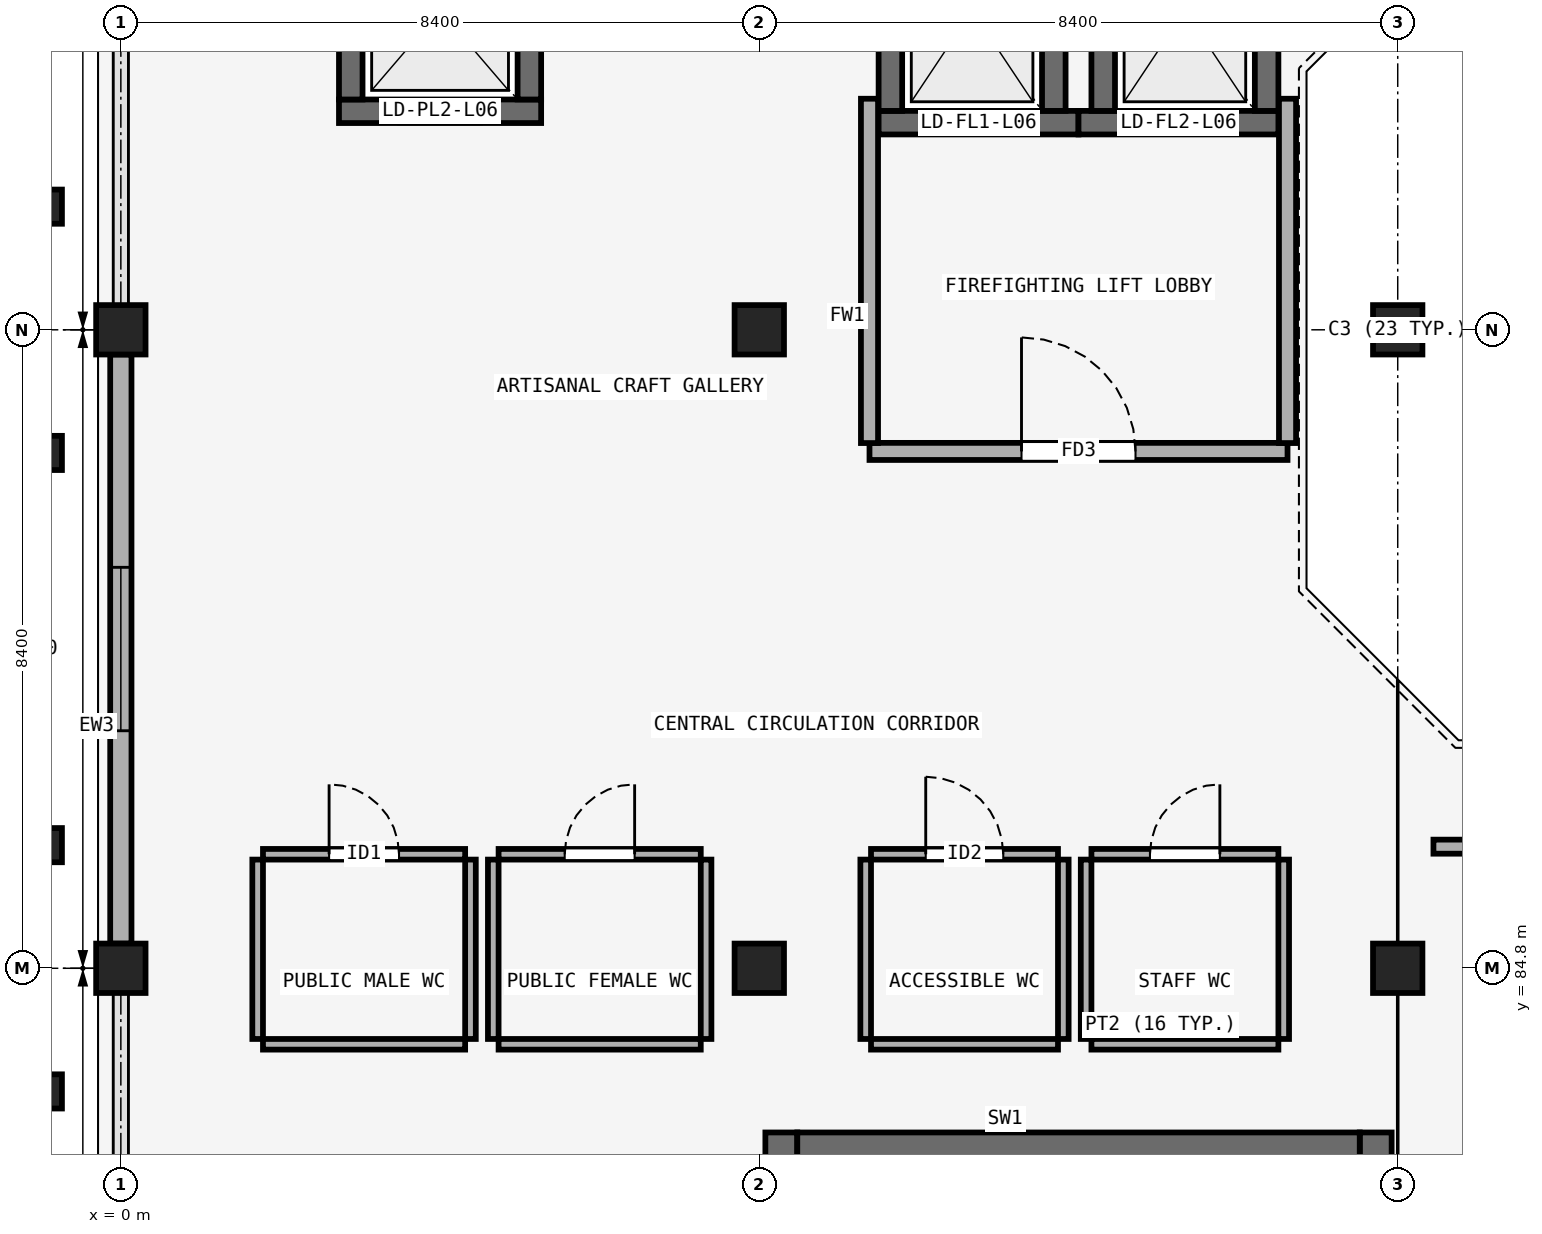
"""IFC4 building model, lengths in metres.
Left out: names, types, materials, properties, quantities, classifications, styles, units other than length and angle.
Written with IfcOpenShell. Run it as: python <this file> out.ifc"""

import sys

from ifc_helpers import new_model, si_unit, direction, frame, frame_2d, origin, origin_2d, place, context, subcontext, project, spatial, rectangle, extrude, element, fill, save


model = new_model("IFC4")
c1 = context("Model", 3, precision=1e-05, world=origin(), true_north=direction((0.0, 1.0)))
c2 = subcontext(c1, "Body", "Model", "MODEL_VIEW")
j1 = project(units=[si_unit("LENGTHUNIT", "METRE"), si_unit("PLANEANGLEUNIT", "RADIAN")], contexts=[c1])
p1 = place(None, origin())
s1 = spatial("IfcSite", under=j1, at=p1, CompositionType="ELEMENT")
p2 = place(p1, origin())
s2 = spatial("IfcBuilding", under=s1, at=p2, CompositionType="ELEMENT")
p3 = place(p2, frame((0.0, 0.0, 27.9)))
s3 = spatial("IfcBuildingStorey", under=s2, at=p3, CompositionType="ELEMENT", Elevation=27.9)
for number, where, z_axis, x_axis in (
    (1, (0.0, 84.8, 0.0), (0.0, 0.0, 1.0), (1.0, 0.0, 0.0)),
    (2, (8.4, 84.8, 0.0), (0.0, 0.0, 1.0), (1.0, 0.0, 0.0)),
    (3, (16.8, 84.8, 0.0), (0.0, 0.0, 1.0), (1.0, 0.0, 0.0)),
    (4, (0.0, 93.2, 0.0), (0.0, 0.0, 1.0), (1.0, 0.0, 0.0)),
    (5, (8.4, 93.2, 0.0), (0.0, 0.0, 1.0), (1.0, 0.0, 0.0)),
    (6, (16.8, 93.2, 0.0), (0.0, 0.0, 1.0), (1.0, 0.0, 0.0)),
):
    element("IfcColumn", number, at=place(p3, frame(where, z_axis=z_axis, x_axis=x_axis)), inside=s3, PredefinedType="COLUMN", context=c2, shape_type="SweptSolid", body=[
        extrude(rectangle(XDim=0.65, YDim=0.65, at=origin_2d()), origin(), (0.0, 0.0, 1.0), 4.5),
    ])
for number, where, z_axis, x_axis in (
    (7, (-1.05, 83.18, 0.0), (0.0, 0.0, 1.0), (0.0, 1.0, 0.0)),
    (8, (-1.05, 86.42, 0.0), (0.0, 0.0, 1.0), (0.0, 1.0, 0.0)),
    (9, (-1.05, 91.58, 0.0), (0.0, 0.0, 1.0), (0.0, 1.0, 0.0)),
    (10, (-1.05, 94.82, 0.0), (0.0, 0.0, 1.0), (0.0, 1.0, 0.0)),
):
    element("IfcColumn", number, at=place(p3, frame(where, z_axis=z_axis, x_axis=x_axis)), inside=s3, PredefinedType="PILASTER", context=c2, shape_type="SweptSolid", body=[
        extrude(rectangle(XDim=0.45, YDim=0.55, at=origin_2d()), origin(), (0.0, 0.0, 1.0), 4.5),
    ])
p4 = place(p3, frame((0.0, 85.125, 0.0), z_axis=(0.0, 0.0, 1.0), x_axis=(0.0, 1.0, 0.0)))
e11 = element("IfcWall", 11, at=p4, inside=s3, PredefinedType="SOLIDWALL", context=c2, shape_type="SweptSolid", body=[
    extrude(rectangle(XDim=7.75, YDim=0.28, at=frame_2d((3.875, 0.0))), origin(), (0.0, 0.0, 1.0), 3.45),
])
p5 = place(p4, frame((2.8, 0.0, 0.95)))
e12 = element("IfcOpeningElement", 12, at=p5, cuts=e11, PredefinedType="OPENING", context=c2, shape_type="SweptSolid", body=[
    extrude(rectangle(XDim=2.15, YDim=1.35, at=frame_2d((1.075, 0.675))), frame((0.0, 0.15, 0.0), z_axis=(0.0, -1.0, 0.0), x_axis=(1.0, 0.0, 0.0)), (0.0, 0.0, 1.0), 0.3),
])
p6 = place(p3, frame((8.69, 82.64, 0.0), z_axis=(0.0, 0.0, 1.0), x_axis=(0.0, -1.0, 0.0)))
e13 = element("IfcWall", 13, at=p6, inside=s3, PredefinedType="SHEAR", context=c2, shape_type="SweptSolid", body=[
    extrude(rectangle(XDim=4.08, YDim=0.42, at=frame_2d((2.04, 0.0))), origin(), (0.0, 0.0, 1.0), 4.2),
])
p7 = place(p6, frame((1.315, 0.0, 0.0)))
e14 = element("IfcOpeningElement", 14, at=p7, cuts=e13, PredefinedType="OPENING", context=c2, shape_type="SweptSolid", body=[
    extrude(rectangle(XDim=1.45, YDim=2.2, at=frame_2d((0.725, 1.1))), frame((0.0, 0.22, 0.0), z_axis=(0.0, -1.0, 0.0), x_axis=(1.0, 0.0, 0.0)), (0.0, 0.0, 1.0), 0.44),
])
p8 = place(p3, frame((16.51, 78.56, 0.0), z_axis=(0.0, 0.0, 1.0), x_axis=(0.0, 1.0, 0.0)))
e15 = element("IfcWall", 15, at=p8, inside=s3, PredefinedType="SHEAR", context=c2, shape_type="SweptSolid", body=[
    extrude(rectangle(XDim=4.08, YDim=0.42, at=frame_2d((2.04, 0.0))), origin(), (0.0, 0.0, 1.0), 4.2),
])
p9 = place(p3, frame((8.9, 82.43, 0.0), z_axis=(0.0, 0.0, 1.0), x_axis=(1.0, 0.0, 0.0)))
e16 = element("IfcWall", 16, at=p9, inside=s3, PredefinedType="SHEAR", context=c2, shape_type="SweptSolid", body=[
    extrude(rectangle(XDim=7.4, YDim=0.42, at=frame_2d((3.7, 0.0))), origin(), (0.0, 0.0, 1.0), 4.2),
])
p10 = place(p3, frame((9.97, 95.925, 0.0), z_axis=(0.0, 0.0, 1.0), x_axis=(1.0, 0.0, 0.0)))
e17 = element("IfcWall", 17, at=p10, inside=s3, PredefinedType="SHEAR", context=c2, shape_type="SweptSolid", body=[
    extrude(rectangle(XDim=2.63, YDim=0.31, at=frame_2d((1.315, 0.0))), origin(), (0.0, 0.0, 1.0), 4.2),
])
p11 = place(p10, frame((0.715, 0.0, 0.0)))
e18 = element("IfcOpeningElement", 18, at=p11, cuts=e17, PredefinedType="OPENING", context=c2, shape_type="SweptSolid", body=[
    extrude(rectangle(XDim=1.2, YDim=2.25, at=frame_2d((0.6, 1.125))), frame((0.0, 0.165, 0.0), z_axis=(0.0, -1.0, 0.0), x_axis=(1.0, 0.0, 0.0)), (0.0, 0.0, 1.0), 0.33),
])
for number, where, z_axis, x_axis in (
    (19, (10.125, 96.08, 0.0), (0.0, 0.0, 1.0), (0.0, 1.0, 0.0)),
    (20, (12.275, 96.08, 0.0), (0.0, 0.0, 1.0), (0.0, 1.0, 0.0)),
):
    element("IfcWall", number, at=place(p3, frame(where, z_axis=z_axis, x_axis=x_axis)), inside=s3, PredefinedType="SHEAR", context=c2, shape_type="SweptSolid", body=[
        extrude(rectangle(XDim=2.64, YDim=0.31, at=frame_2d((1.32, 0.0))), origin(), (0.0, 0.0, 1.0), 4.2),
    ])
p12 = place(p3, frame((12.6, 95.925, 0.0), z_axis=(0.0, 0.0, 1.0), x_axis=(1.0, 0.0, 0.0)))
e21 = element("IfcWall", 21, at=p12, inside=s3, PredefinedType="SHEAR", context=c2, shape_type="SweptSolid", body=[
    extrude(rectangle(XDim=2.63, YDim=0.31, at=frame_2d((1.315, 0.0))), origin(), (0.0, 0.0, 1.0), 4.2),
])
p13 = place(p12, frame((0.715, 0.0, 0.0)))
e22 = element("IfcOpeningElement", 22, at=p13, cuts=e21, PredefinedType="OPENING", context=c2, shape_type="SweptSolid", body=[
    extrude(rectangle(XDim=1.2, YDim=2.25, at=frame_2d((0.6, 1.125))), frame((0.0, 0.165, 0.0), z_axis=(0.0, -1.0, 0.0), x_axis=(1.0, 0.0, 0.0)), (0.0, 0.0, 1.0), 0.33),
])
for number, where, z_axis, x_axis in (
    (23, (12.925, 96.08, 0.0), (0.0, 0.0, 1.0), (0.0, 1.0, 0.0)),
    (24, (15.075, 96.08, 0.0), (0.0, 0.0, 1.0), (0.0, 1.0, 0.0)),
):
    element("IfcWall", number, at=place(p3, frame(where, z_axis=z_axis, x_axis=x_axis)), inside=s3, PredefinedType="SHEAR", context=c2, shape_type="SweptSolid", body=[
        extrude(rectangle(XDim=2.64, YDim=0.31, at=frame_2d((1.32, 0.0))), origin(), (0.0, 0.0, 1.0), 4.2),
    ])
p14 = place(p3, frame((2.87, 96.075, 0.0), z_axis=(0.0, 0.0, 1.0), x_axis=(1.0, 0.0, 0.0)))
e25 = element("IfcWall", 25, at=p14, inside=s3, PredefinedType="SHEAR", context=c2, shape_type="SweptSolid", body=[
    extrude(rectangle(XDim=2.66, YDim=0.31, at=frame_2d((1.33, 0.0))), origin(), (0.0, 0.0, 1.0), 4.2),
])
p15 = place(p14, frame((0.78, 0.0, 0.0)))
e26 = element("IfcOpeningElement", 26, at=p15, cuts=e25, PredefinedType="OPENING", context=c2, shape_type="SweptSolid", body=[
    extrude(rectangle(XDim=1.1, YDim=2.2, at=frame_2d((0.55, 1.1))), frame((0.0, 0.165, 0.0), z_axis=(0.0, -1.0, 0.0), x_axis=(1.0, 0.0, 0.0)), (0.0, 0.0, 1.0), 0.33),
])
for number, where, z_axis, x_axis in (
    (27, (3.025, 96.23, 0.0), (0.0, 0.0, 1.0), (0.0, 1.0, 0.0)),
    (28, (5.375, 96.23, 0.0), (0.0, 0.0, 1.0), (0.0, 1.0, 0.0)),
):
    element("IfcWall", number, at=place(p3, frame(where, z_axis=z_axis, x_axis=x_axis)), inside=s3, PredefinedType="SHEAR", context=c2, shape_type="SweptSolid", body=[
        extrude(rectangle(XDim=2.34, YDim=0.31, at=frame_2d((1.17, 0.0))), origin(), (0.0, 0.0, 1.0), 4.2),
    ])
p16 = place(p3, frame((9.85, 91.6, 0.0), z_axis=(0.0, 0.0, 1.0), x_axis=(1.0, 0.0, 0.0)))
e29 = element("IfcWall", 29, at=p16, inside=s3, PredefinedType="PARTITIONING", context=c2, shape_type="SweptSolid", body=[
    extrude(rectangle(XDim=5.5, YDim=0.225, at=frame_2d((2.75, 0.0))), origin(), (0.0, 0.0, 1.0), 4.2),
])
p17 = place(p16, frame((2.0, 0.0, 0.0)))
e30 = element("IfcOpeningElement", 30, at=p17, cuts=e29, PredefinedType="OPENING", context=c2, shape_type="SweptSolid", body=[
    extrude(rectangle(XDim=1.5, YDim=2.25, at=frame_2d((0.75, 1.125))), frame((0.0, 0.123, 0.0), z_axis=(0.0, -1.0, 0.0), x_axis=(1.0, 0.0, 0.0)), (0.0, 0.0, 1.0), 0.245),
])
for number, where, z_axis, x_axis in (
    (31, (9.85, 91.71, 0.0), (0.0, 0.0, 1.0), (0.0, 1.0, 0.0)),
    (32, (15.35, 91.71, 0.0), (0.0, 0.0, 1.0), (0.0, 1.0, 0.0)),
):
    element("IfcWall", number, at=place(p3, frame(where, z_axis=z_axis, x_axis=x_axis)), inside=s3, PredefinedType="PARTITIONING", context=c2, shape_type="SweptSolid", body=[
        extrude(rectangle(XDim=4.53, YDim=0.225, at=frame_2d((2.265, 0.0))), origin(), (0.0, 0.0, 1.0), 3.5),
    ])
p18 = place(p3, frame((1.87, 86.3, 0.0), z_axis=(0.0, 0.0, 1.0), x_axis=(1.0, 0.0, 0.0)))
e33 = element("IfcWall", 33, at=p18, inside=s3, PredefinedType="PARTITIONING", context=c2, shape_type="SweptSolid", body=[
    extrude(rectangle(XDim=2.66, YDim=0.14, at=frame_2d((1.33, 0.0))), origin(), (0.0, 0.0, 1.0), 4.2),
])
p19 = place(p18, frame((0.87, 0.0, 0.0)))
e34 = element("IfcOpeningElement", 34, at=p19, cuts=e33, PredefinedType="OPENING", context=c2, shape_type="SweptSolid", body=[
    extrude(rectangle(XDim=0.92, YDim=2.12, at=frame_2d((0.46, 1.06))), frame((0.0, 0.08, 0.0), z_axis=(0.0, -1.0, 0.0), x_axis=(1.0, 0.0, 0.0)), (0.0, 0.0, 1.0), 0.16),
])
p20 = place(p3, frame((1.87, 83.8, 0.0), z_axis=(0.0, 0.0, 1.0), x_axis=(1.0, 0.0, 0.0)))
e35 = element("IfcWall", 35, at=p20, inside=s3, PredefinedType="PARTITIONING", context=c2, shape_type="SweptSolid", body=[
    extrude(rectangle(XDim=2.66, YDim=0.14, at=frame_2d((1.33, 0.0))), origin(), (0.0, 0.0, 1.0), 4.2),
])
for number, where, z_axis, x_axis in (
    (36, (1.8, 83.87, 0.0), (0.0, 0.0, 1.0), (0.0, 1.0, 0.0)),
    (37, (4.6, 83.87, 0.0), (0.0, 0.0, 1.0), (0.0, 1.0, 0.0)),
):
    element("IfcWall", number, at=place(p3, frame(where, z_axis=z_axis, x_axis=x_axis)), inside=s3, PredefinedType="PARTITIONING", context=c2, shape_type="SweptSolid", body=[
        extrude(rectangle(XDim=2.36, YDim=0.14, at=frame_2d((1.18, 0.0))), origin(), (0.0, 0.0, 1.0), 3.45),
    ])
p21 = place(p3, frame((4.97, 86.3, 0.0), z_axis=(0.0, 0.0, 1.0), x_axis=(1.0, 0.0, 0.0)))
e38 = element("IfcWall", 38, at=p21, inside=s3, PredefinedType="PARTITIONING", context=c2, shape_type="SweptSolid", body=[
    extrude(rectangle(XDim=2.66, YDim=0.14, at=frame_2d((1.33, 0.0))), origin(), (0.0, 0.0, 1.0), 4.2),
])
p22 = place(p21, frame((0.87, 0.0, 0.0)))
e39 = element("IfcOpeningElement", 39, at=p22, cuts=e38, PredefinedType="OPENING", context=c2, shape_type="SweptSolid", body=[
    extrude(rectangle(XDim=0.92, YDim=2.12, at=frame_2d((0.46, 1.06))), frame((0.0, 0.08, 0.0), z_axis=(0.0, -1.0, 0.0), x_axis=(1.0, 0.0, 0.0)), (0.0, 0.0, 1.0), 0.16),
])
p23 = place(p3, frame((4.97, 83.8, 0.0), z_axis=(0.0, 0.0, 1.0), x_axis=(1.0, 0.0, 0.0)))
e40 = element("IfcWall", 40, at=p23, inside=s3, PredefinedType="PARTITIONING", context=c2, shape_type="SweptSolid", body=[
    extrude(rectangle(XDim=2.66, YDim=0.14, at=frame_2d((1.33, 0.0))), origin(), (0.0, 0.0, 1.0), 4.2),
])
for number, where, z_axis, x_axis in (
    (41, (4.9, 83.87, 0.0), (0.0, 0.0, 1.0), (0.0, 1.0, 0.0)),
    (42, (7.7, 83.87, 0.0), (0.0, 0.0, 1.0), (0.0, 1.0, 0.0)),
):
    element("IfcWall", number, at=place(p3, frame(where, z_axis=z_axis, x_axis=x_axis)), inside=s3, PredefinedType="PARTITIONING", context=c2, shape_type="SweptSolid", body=[
        extrude(rectangle(XDim=2.36, YDim=0.14, at=frame_2d((1.18, 0.0))), origin(), (0.0, 0.0, 1.0), 3.45),
    ])
p24 = place(p3, frame((9.87, 86.3, 0.0), z_axis=(0.0, 0.0, 1.0), x_axis=(1.0, 0.0, 0.0)))
e43 = element("IfcWall", 43, at=p24, inside=s3, PredefinedType="PARTITIONING", context=c2, shape_type="SweptSolid", body=[
    extrude(rectangle(XDim=2.46, YDim=0.14, at=frame_2d((1.23, 0.0))), origin(), (0.0, 0.0, 1.0), 4.2),
])
p25 = place(p24, frame((0.72, 0.0, 0.0)))
e44 = element("IfcOpeningElement", 44, at=p25, cuts=e43, PredefinedType="OPENING", context=c2, shape_type="SweptSolid", body=[
    extrude(rectangle(XDim=1.02, YDim=2.15, at=frame_2d((0.51, 1.075))), frame((0.0, 0.08, 0.0), z_axis=(0.0, -1.0, 0.0), x_axis=(1.0, 0.0, 0.0)), (0.0, 0.0, 1.0), 0.16),
])
p26 = place(p3, frame((9.87, 83.8, 0.0), z_axis=(0.0, 0.0, 1.0), x_axis=(1.0, 0.0, 0.0)))
e45 = element("IfcWall", 45, at=p26, inside=s3, PredefinedType="PARTITIONING", context=c2, shape_type="SweptSolid", body=[
    extrude(rectangle(XDim=2.46, YDim=0.14, at=frame_2d((1.23, 0.0))), origin(), (0.0, 0.0, 1.0), 4.2),
])
for number, where, z_axis, x_axis in (
    (46, (9.8, 83.87, 0.0), (0.0, 0.0, 1.0), (0.0, 1.0, 0.0)),
    (47, (12.4, 83.87, 0.0), (0.0, 0.0, 1.0), (0.0, 1.0, 0.0)),
):
    element("IfcWall", number, at=place(p3, frame(where, z_axis=z_axis, x_axis=x_axis)), inside=s3, PredefinedType="PARTITIONING", context=c2, shape_type="SweptSolid", body=[
        extrude(rectangle(XDim=2.36, YDim=0.14, at=frame_2d((1.18, 0.0))), origin(), (0.0, 0.0, 1.0), 3.45),
    ])
p27 = place(p3, frame((12.77, 86.3, 0.0), z_axis=(0.0, 0.0, 1.0), x_axis=(1.0, 0.0, 0.0)))
e48 = element("IfcWall", 48, at=p27, inside=s3, PredefinedType="PARTITIONING", context=c2, shape_type="SweptSolid", body=[
    extrude(rectangle(XDim=2.46, YDim=0.14, at=frame_2d((1.23, 0.0))), origin(), (0.0, 0.0, 1.0), 4.2),
])
p28 = place(p27, frame((0.77, 0.0, 0.0)))
e49 = element("IfcOpeningElement", 49, at=p28, cuts=e48, PredefinedType="OPENING", context=c2, shape_type="SweptSolid", body=[
    extrude(rectangle(XDim=0.92, YDim=2.12, at=frame_2d((0.46, 1.06))), frame((0.0, 0.08, 0.0), z_axis=(0.0, -1.0, 0.0), x_axis=(1.0, 0.0, 0.0)), (0.0, 0.0, 1.0), 0.16),
])
p29 = place(p3, frame((12.77, 83.8, 0.0), z_axis=(0.0, 0.0, 1.0), x_axis=(1.0, 0.0, 0.0)))
e50 = element("IfcWall", 50, at=p29, inside=s3, PredefinedType="PARTITIONING", context=c2, shape_type="SweptSolid", body=[
    extrude(rectangle(XDim=2.46, YDim=0.14, at=frame_2d((1.23, 0.0))), origin(), (0.0, 0.0, 1.0), 4.2),
])
for number, where, z_axis, x_axis in (
    (51, (12.7, 83.87, 0.0), (0.0, 0.0, 1.0), (0.0, 1.0, 0.0)),
    (52, (15.3, 83.87, 0.0), (0.0, 0.0, 1.0), (0.0, 1.0, 0.0)),
):
    element("IfcWall", number, at=place(p3, frame(where, z_axis=z_axis, x_axis=x_axis)), inside=s3, PredefinedType="PARTITIONING", context=c2, shape_type="SweptSolid", body=[
        extrude(rectangle(XDim=2.36, YDim=0.14, at=frame_2d((1.18, 0.0))), origin(), (0.0, 0.0, 1.0), 3.45),
    ])
p30 = place(p3, frame((17.27, 86.4, 0.0), z_axis=(0.0, 0.0, 1.0), x_axis=(1.0, 0.0, 0.0)))
e53 = element("IfcWall", 53, at=p30, inside=s3, PredefinedType="PARTITIONING", context=c2, shape_type="SweptSolid", body=[
    extrude(rectangle(XDim=7.61, YDim=0.185, at=frame_2d((3.805, 0.0))), origin(), (0.0, 0.0, 1.0), 4.2),
])
p31 = place(p5, origin())
e54 = element("IfcWindow", 54, at=p31, inside=s3, PartitioningType="DOUBLE_PANEL_VERTICAL", PredefinedType="WINDOW", context=c2, shape_type="SweptSolid", body=[
    extrude(rectangle(XDim=2.15, YDim=1.35, at=frame_2d((1.075, 0.675))), frame((0.0, 0.03, 0.0), z_axis=(0.0, -1.0, 0.0), x_axis=(1.0, 0.0, 0.0)), (0.0, 0.0, 1.0), 0.06),
])
fill(e12, e54)
p32 = place(p11, origin())
e55 = element("IfcDoor", 55, at=p32, inside=s3, OperationType="SLIDING_TO_LEFT", PredefinedType="DOOR", context=c2, shape_type="SweptSolid", body=[
    extrude(rectangle(XDim=1.2, YDim=2.25, at=frame_2d((0.6, 1.125))), frame((0.0, 0.025, 0.0), z_axis=(0.0, -1.0, 0.0), x_axis=(1.0, 0.0, 0.0)), (0.0, 0.0, 1.0), 0.05),
])
fill(e18, e55)
p33 = place(p13, origin())
e56 = element("IfcDoor", 56, at=p33, inside=s3, OperationType="SLIDING_TO_LEFT", PredefinedType="DOOR", context=c2, shape_type="SweptSolid", body=[
    extrude(rectangle(XDim=1.2, YDim=2.25, at=frame_2d((0.6, 1.125))), frame((0.0, 0.025, 0.0), z_axis=(0.0, -1.0, 0.0), x_axis=(1.0, 0.0, 0.0)), (0.0, 0.0, 1.0), 0.05),
])
fill(e22, e56)
p34 = place(p15, origin())
e57 = element("IfcDoor", 57, at=p34, inside=s3, OperationType="SLIDING_TO_LEFT", PredefinedType="DOOR", context=c2, shape_type="SweptSolid", body=[
    extrude(rectangle(XDim=1.1, YDim=2.2, at=frame_2d((0.55, 1.1))), frame((0.0, 0.025, 0.0), z_axis=(0.0, -1.0, 0.0), x_axis=(1.0, 0.0, 0.0)), (0.0, 0.0, 1.0), 0.05),
])
fill(e26, e57)
p35 = place(p17, origin())
e58 = element("IfcDoor", 58, at=p35, inside=s3, OperationType="SINGLE_SWING_LEFT", PredefinedType="DOOR", context=c2, shape_type="SweptSolid", body=[
    extrude(rectangle(XDim=1.5, YDim=2.25, at=frame_2d((0.75, 1.125))), frame((0.0, 0.025, 0.0), z_axis=(0.0, -1.0, 0.0), x_axis=(1.0, 0.0, 0.0)), (0.0, 0.0, 1.0), 0.05),
])
fill(e30, e58)
p36 = place(p19, origin())
e59 = element("IfcDoor", 59, at=p36, inside=s3, OperationType="SINGLE_SWING_LEFT", PredefinedType="DOOR", context=c2, shape_type="SweptSolid", body=[
    extrude(rectangle(XDim=0.92, YDim=2.12, at=frame_2d((0.46, 1.06))), frame((0.0, 0.025, 0.0), z_axis=(0.0, -1.0, 0.0), x_axis=(1.0, 0.0, 0.0)), (0.0, 0.0, 1.0), 0.05),
])
fill(e34, e59)
p37 = place(p22, origin())
e60 = element("IfcDoor", 60, at=p37, inside=s3, OperationType="SINGLE_SWING_RIGHT", PredefinedType="DOOR", context=c2, shape_type="SweptSolid", body=[
    extrude(rectangle(XDim=0.92, YDim=2.12, at=frame_2d((0.46, 1.06))), frame((0.0, 0.025, 0.0), z_axis=(0.0, -1.0, 0.0), x_axis=(1.0, 0.0, 0.0)), (0.0, 0.0, 1.0), 0.05),
])
fill(e39, e60)
p38 = place(p25, origin())
e61 = element("IfcDoor", 61, at=p38, inside=s3, OperationType="SINGLE_SWING_LEFT", PredefinedType="DOOR", context=c2, shape_type="SweptSolid", body=[
    extrude(rectangle(XDim=1.02, YDim=2.15, at=frame_2d((0.51, 1.075))), frame((0.0, 0.025, 0.0), z_axis=(0.0, -1.0, 0.0), x_axis=(1.0, 0.0, 0.0)), (0.0, 0.0, 1.0), 0.05),
])
fill(e44, e61)
p39 = place(p28, origin())
e62 = element("IfcDoor", 62, at=p39, inside=s3, OperationType="SINGLE_SWING_RIGHT", PredefinedType="DOOR", context=c2, shape_type="SweptSolid", body=[
    extrude(rectangle(XDim=0.92, YDim=2.12, at=frame_2d((0.46, 1.06))), frame((0.0, 0.025, 0.0), z_axis=(0.0, -1.0, 0.0), x_axis=(1.0, 0.0, 0.0)), (0.0, 0.0, 1.0), 0.05),
])
fill(e49, e62)
save(model, sys.argv[1])
